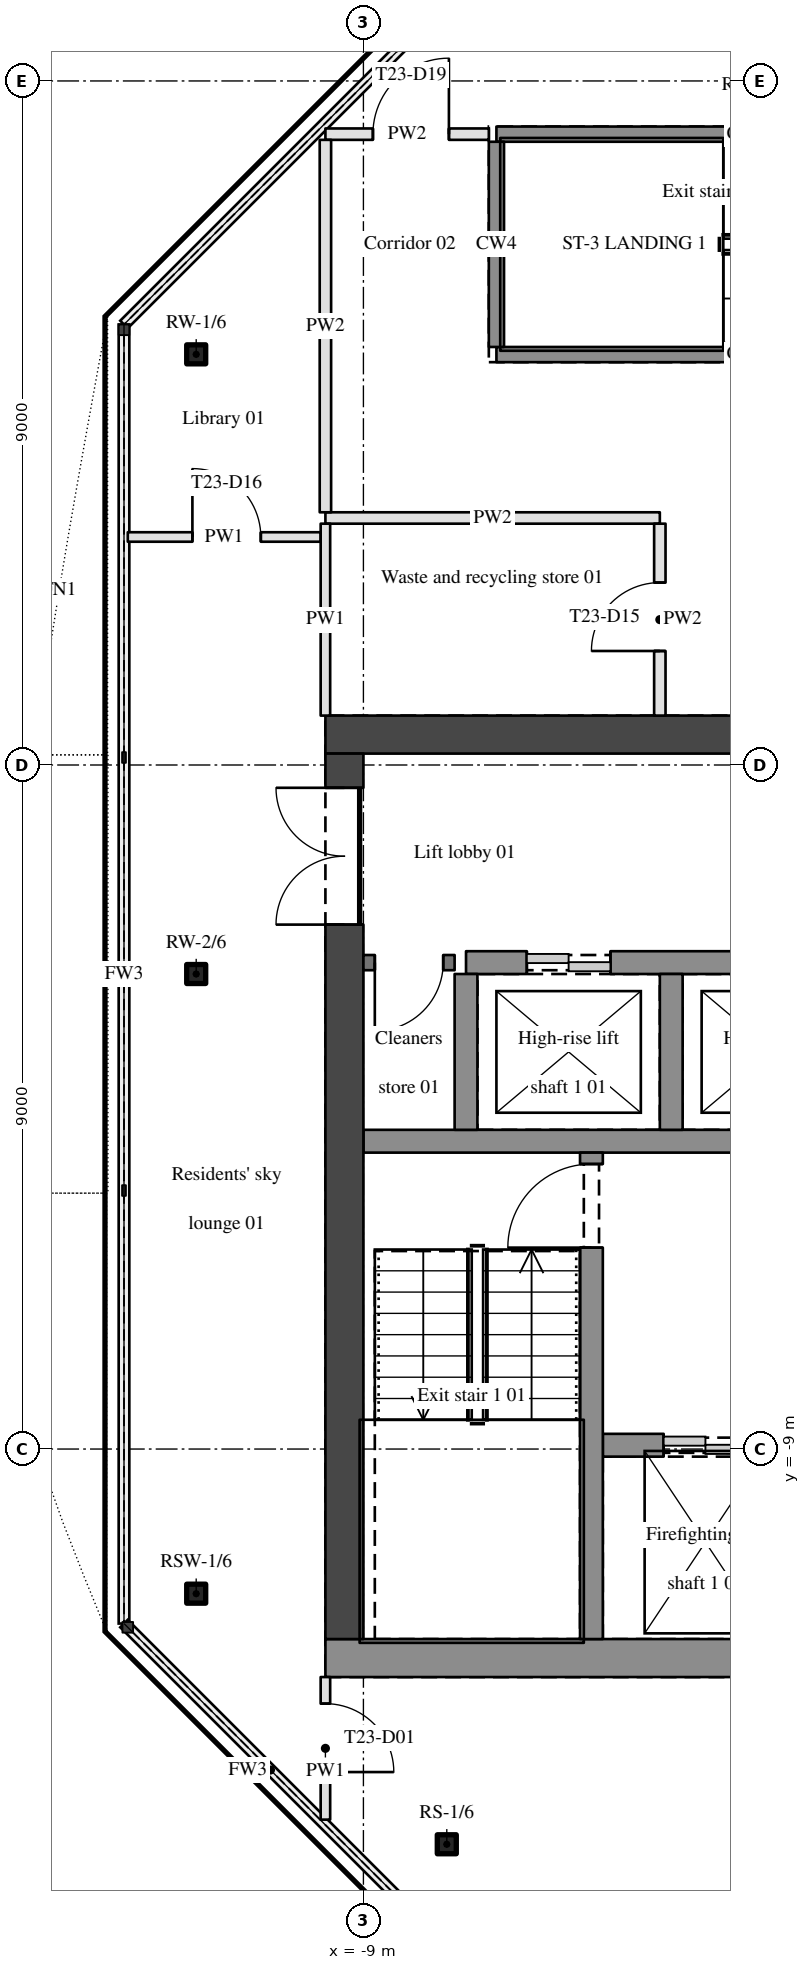
"""IFC4 building model, lengths in metres.
Left out: names, types, materials, properties, quantities, classifications, styles, units other than length and angle.
Written with IfcOpenShell. Run it as: python <this file> out.ifc"""

import sys

from ifc_helpers import new_model, si_unit, direction, frame, frame_2d, origin, origin_2d, place, context, subcontext, project, spatial, rectangle, hollow_rectangle, extrude, element, fill, save


model = new_model("IFC4")
c1 = context("Model", 3, precision=1e-05, world=origin(), true_north=direction((0.0, 1.0)))
c2 = subcontext(c1, "Body", "Model", "MODEL_VIEW")
j1 = project(units=[si_unit("LENGTHUNIT", "METRE"), si_unit("PLANEANGLEUNIT", "RADIAN")], contexts=[c1])
p1 = place(None, origin())
s1 = spatial("IfcSite", under=j1, at=p1, CompositionType="ELEMENT")
p2 = place(p1, origin())
s2 = spatial("IfcBuilding", under=s1, at=p2, CompositionType="ELEMENT")
p3 = place(p2, frame((0.0, 0.0, 294.15)))
s3 = spatial("IfcBuildingStorey", under=s2, at=p3, CompositionType="ELEMENT", Elevation=294.15)
for number, where, z_axis, x_axis in (
    (1, (-7.903, -14.2, 0.0), (0.0, 0.0, 1.0), (1.0, 0.0, 0.0)),
    (2, (-11.2, 5.403, 0.0), (0.0, 0.0, 1.0), (1.0, 0.0, 0.0)),
    (3, (-11.2, -2.75, 0.0), (0.0, 0.0, 1.0), (1.0, 0.0, 0.0)),
    (4, (-11.2, -10.903, 0.0), (0.0, 0.0, 1.0), (1.0, 0.0, 0.0)),
):
    element("IfcColumn", number, at=place(p3, frame(where, z_axis=z_axis, x_axis=x_axis)), inside=s3, PredefinedType="COLUMN", context=c2, shape_type="SweptSolid", body=[
        extrude(hollow_rectangle(XDim=0.25, YDim=0.25, WallThickness=0.02, InnerFilletRadius=0.03, OuterFilletRadius=0.05, at=origin_2d()), origin(), (0.0, 0.0, 1.0), 3.15),
    ])
p4 = place(p3, frame((-9.5, -11.75, 0.0), z_axis=(0.0, 0.0, 1.0), x_axis=(1.0, 0.0, 0.0)))
e5 = element("IfcWall", 5, at=p4, inside=s3, PredefinedType="SHEAR", context=c2, shape_type="SweptSolid", body=[
    extrude(rectangle(XDim=19.0, YDim=0.5, at=frame_2d((9.5, 0.0))), origin(), (0.0, 0.0, 1.0), 3.15),
])
p5 = place(p3, frame((-9.5, 0.4, 0.0), z_axis=(0.0, 0.0, 1.0), x_axis=(1.0, 0.0, 0.0)))
e6 = element("IfcWall", 6, at=p5, inside=s3, PredefinedType="SHEAR", context=c2, shape_type="SweptSolid", body=[
    extrude(rectangle(XDim=19.0, YDim=0.5, at=frame_2d((9.5, 0.0))), origin(), (0.0, 0.0, 1.0), 3.15),
])
p6 = place(p5, frame((8.6, 0.0, 0.0)))
e7 = element("IfcOpeningElement", 7, at=p6, cuts=e6, PredefinedType="OPENING", context=c2, shape_type="SweptSolid", body=[
    extrude(rectangle(XDim=1.8, YDim=2.1, at=frame_2d((0.9, 1.05))), frame((0.0, 0.26, 0.0), z_axis=(0.0, -1.0, 0.0), x_axis=(1.0, 0.0, 0.0)), (0.0, 0.0, 1.0), 0.52),
])
p7 = place(p5, frame((15.55, 0.0, 0.0)))
e8 = element("IfcOpeningElement", 8, at=p7, cuts=e6, PredefinedType="OPENING", context=c2, shape_type="SweptSolid", body=[
    extrude(rectangle(XDim=0.9, YDim=2.1, at=frame_2d((0.45, 1.05))), frame((0.0, 0.26, 0.0), z_axis=(0.0, -1.0, 0.0), x_axis=(1.0, 0.0, 0.0)), (0.0, 0.0, 1.0), 0.52),
])
p8 = place(p3, frame((-9.25, -11.5, 0.0), z_axis=(0.0, 0.0, 1.0), x_axis=(0.0, 1.0, 0.0)))
e9 = element("IfcWall", 9, at=p8, inside=s3, PredefinedType="SHEAR", context=c2, shape_type="SweptSolid", body=[
    extrude(rectangle(XDim=11.65, YDim=0.5, at=frame_2d((5.825, 0.0))), origin(), (0.0, 0.0, 1.0), 3.15),
])
p9 = place(p8, frame((9.4, 0.0, 0.0)))
e10 = element("IfcOpeningElement", 10, at=p9, cuts=e9, PredefinedType="OPENING", context=c2, shape_type="SweptSolid", body=[
    extrude(rectangle(XDim=1.8, YDim=2.1, at=frame_2d((0.9, 1.05))), frame((0.0, 0.26, 0.0), z_axis=(0.0, -1.0, 0.0), x_axis=(1.0, 0.0, 0.0)), (0.0, 0.0, 1.0), 0.52),
])
p10 = place(p3, frame((-5.85, -8.95, 0.0), z_axis=(0.0, 0.0, 1.0), x_axis=(1.0, 0.0, 0.0)))
e11 = element("IfcWall", 11, at=p10, inside=s3, PredefinedType="SHEAR", context=c2, shape_type="SweptSolid", body=[
    extrude(rectangle(XDim=11.7, YDim=0.3, at=frame_2d((5.85, 0.0))), origin(), (0.0, 0.0, 1.0), 3.15),
])
p11 = place(p10, frame((0.8, 0.0, 0.0)))
e12 = element("IfcOpeningElement", 12, at=p11, cuts=e11, PredefinedType="OPENING", context=c2, shape_type="SweptSolid", body=[
    extrude(rectangle(XDim=1.1, YDim=2.1, at=frame_2d((0.55, 1.05))), frame((0.0, 0.16, 0.0), z_axis=(0.0, -1.0, 0.0), x_axis=(1.0, 0.0, 0.0)), (0.0, 0.0, 1.0), 0.32),
])
p12 = place(p10, frame((3.8, 0.0, 0.0)))
e13 = element("IfcOpeningElement", 13, at=p12, cuts=e11, PredefinedType="OPENING", context=c2, shape_type="SweptSolid", body=[
    extrude(rectangle(XDim=1.1, YDim=2.1, at=frame_2d((0.55, 1.05))), frame((0.0, 0.16, 0.0), z_axis=(0.0, -1.0, 0.0), x_axis=(1.0, 0.0, 0.0)), (0.0, 0.0, 1.0), 0.32),
])
p13 = place(p10, frame((6.8, 0.0, 0.0)))
e14 = element("IfcOpeningElement", 14, at=p13, cuts=e11, PredefinedType="OPENING", context=c2, shape_type="SweptSolid", body=[
    extrude(rectangle(XDim=1.1, YDim=2.1, at=frame_2d((0.55, 1.05))), frame((0.0, 0.16, 0.0), z_axis=(0.0, -1.0, 0.0), x_axis=(1.0, 0.0, 0.0)), (0.0, 0.0, 1.0), 0.32),
])
p14 = place(p10, frame((9.8, 0.0, 0.0)))
e15 = element("IfcOpeningElement", 15, at=p14, cuts=e11, PredefinedType="OPENING", context=c2, shape_type="SweptSolid", body=[
    extrude(rectangle(XDim=1.1, YDim=2.1, at=frame_2d((0.55, 1.05))), frame((0.0, 0.16, 0.0), z_axis=(0.0, -1.0, 0.0), x_axis=(1.0, 0.0, 0.0)), (0.0, 0.0, 1.0), 0.32),
])
p15 = place(p3, frame((-9.0, -4.95, 0.0), z_axis=(0.0, 0.0, 1.0), x_axis=(1.0, 0.0, 0.0)))
e16 = element("IfcWall", 16, at=p15, inside=s3, PredefinedType="SHEAR", context=c2, shape_type="SweptSolid", body=[
    extrude(rectangle(XDim=6.75, YDim=0.3, at=frame_2d((3.375, 0.0))), origin(), (0.0, 0.0, 1.0), 3.15),
])
p16 = place(p3, frame((-7.8, -2.6, 0.0), z_axis=(0.0, 0.0, 1.0), x_axis=(-1.0, 0.0, 0.0)))
e17 = element("IfcWall", 17, at=p16, inside=s3, PredefinedType="SOLIDWALL", context=c2, shape_type="SweptSolid", body=[
    extrude(rectangle(XDim=1.2, YDim=0.2, at=frame_2d((0.6, 0.0))), origin(), (0.0, 0.0, 1.0), 2.85),
])
p17 = place(p16, frame((0.15, 0.0, 0.0)))
e18 = element("IfcOpeningElement", 18, at=p17, cuts=e17, PredefinedType="OPENING", context=c2, shape_type="SweptSolid", body=[
    extrude(rectangle(XDim=0.9, YDim=2.1, at=frame_2d((0.45, 1.05))), frame((0.0, 0.11, 0.0), z_axis=(0.0, -1.0, 0.0), x_axis=(1.0, 0.0, 0.0)), (0.0, 0.0, 1.0), 0.22),
])
p18 = place(p3, frame((-7.65, -2.6, 0.0), z_axis=(0.0, 0.0, 1.0), x_axis=(1.0, 0.0, 0.0)))
e19 = element("IfcWall", 19, at=p18, inside=s3, PredefinedType="SHEAR", context=c2, shape_type="SweptSolid", body=[
    extrude(rectangle(XDim=5.4, YDim=0.3, at=frame_2d((2.7, 0.0))), origin(), (0.0, 0.0, 1.0), 3.15),
])
p19 = place(p18, frame((0.8, 0.0, 0.0)))
e20 = element("IfcOpeningElement", 20, at=p19, cuts=e19, PredefinedType="OPENING", context=c2, shape_type="SweptSolid", body=[
    extrude(rectangle(XDim=1.1, YDim=2.1, at=frame_2d((0.55, 1.05))), frame((0.0, 0.16, 0.0), z_axis=(0.0, -1.0, 0.0), x_axis=(1.0, 0.0, 0.0)), (0.0, 0.0, 1.0), 0.32),
])
p20 = place(p18, frame((3.5, 0.0, 0.0)))
e21 = element("IfcOpeningElement", 21, at=p20, cuts=e19, PredefinedType="OPENING", context=c2, shape_type="SweptSolid", body=[
    extrude(rectangle(XDim=1.1, YDim=2.1, at=frame_2d((0.55, 1.05))), frame((0.0, 0.16, 0.0), z_axis=(0.0, -1.0, 0.0), x_axis=(1.0, 0.0, 0.0)), (0.0, 0.0, 1.0), 0.32),
])
p21 = place(p3, frame((-12.1, 3.0, 0.0), z_axis=(0.0, 0.0, 1.0), x_axis=(1.0, 0.0, 0.0)))
e22 = element("IfcWall", 22, at=p21, inside=s3, PredefinedType="PARTITIONING", context=c2, shape_type="SweptSolid", body=[
    extrude(rectangle(XDim=2.538, YDim=0.125, at=frame_2d((1.269, 0.0))), origin(), (0.0, 0.0, 1.0), 2.21),
])
p22 = place(p21, frame((0.85, 0.0, 0.0)))
e23 = element("IfcOpeningElement", 23, at=p22, cuts=e22, PredefinedType="OPENING", context=c2, shape_type="SweptSolid", body=[
    extrude(rectangle(XDim=0.9, YDim=2.1, at=frame_2d((0.45, 1.05))), frame((0.0, 0.073, 0.0), z_axis=(0.0, -1.0, 0.0), x_axis=(1.0, 0.0, 0.0)), (0.0, 0.0, 1.0), 0.145),
])
p23 = place(p3, frame((-9.5, 3.25, 0.0), z_axis=(0.0, 0.0, 1.0), x_axis=(1.0, 0.0, 0.0)))
e24 = element("IfcWall", 24, at=p23, inside=s3, PredefinedType="PARTITIONING", context=c2, shape_type="SweptSolid", body=[
    extrude(rectangle(XDim=4.4, YDim=0.15, at=frame_2d((2.2, 0.0))), origin(), (0.0, 0.0, 1.0), 2.21),
])
p24 = place(p3, frame((-7.25, 5.4, 0.0), z_axis=(0.0, 0.0, 1.0), x_axis=(1.0, 0.0, 0.0)))
e25 = element("IfcWall", 25, at=p24, inside=s3, PredefinedType="SHEAR", context=c2, shape_type="SweptSolid", body=[
    extrude(rectangle(XDim=6.6, YDim=0.2, at=frame_2d((3.3, 0.0))), origin(), (0.0, 0.0, 1.0), 3.15),
])
p25 = place(p24, frame((5.35, 0.0, 0.0)))
e26 = element("IfcOpeningElement", 26, at=p25, cuts=e25, PredefinedType="OPENING", context=c2, shape_type="SweptSolid", body=[
    extrude(rectangle(XDim=1.1, YDim=2.1, at=frame_2d((0.55, 1.05))), frame((0.0, 0.11, 0.0), z_axis=(0.0, -1.0, 0.0), x_axis=(1.0, 0.0, 0.0)), (0.0, 0.0, 1.0), 0.22),
])
p26 = place(p3, frame((-9.5, 8.3, 0.0), z_axis=(0.0, 0.0, 1.0), x_axis=(1.0, 0.0, 0.0)))
e27 = element("IfcWall", 27, at=p26, inside=s3, PredefinedType="PARTITIONING", context=c2, shape_type="SweptSolid", body=[
    extrude(rectangle(XDim=2.15, YDim=0.15, at=frame_2d((1.075, 0.0))), origin(), (0.0, 0.0, 1.0), 2.21),
])
p27 = place(p26, frame((0.625, 0.0, 0.0)))
e28 = element("IfcOpeningElement", 28, at=p27, cuts=e27, PredefinedType="OPENING", context=c2, shape_type="SweptSolid", body=[
    extrude(rectangle(XDim=1.0, YDim=2.1, at=frame_2d((0.5, 1.05))), frame((0.0, 0.085, 0.0), z_axis=(0.0, -1.0, 0.0), x_axis=(1.0, 0.0, 0.0)), (0.0, 0.0, 1.0), 0.17),
])
p28 = place(p3, frame((-7.25, 8.3, 0.0), z_axis=(0.0, 0.0, 1.0), x_axis=(1.0, 0.0, 0.0)))
e29 = element("IfcWall", 29, at=p28, inside=s3, PredefinedType="SHEAR", context=c2, shape_type="SweptSolid", body=[
    extrude(rectangle(XDim=6.6, YDim=0.2, at=frame_2d((3.3, 0.0))), origin(), (0.0, 0.0, 1.0), 3.15),
])
p29 = place(p3, frame((-9.5, -12.0, 0.0), z_axis=(0.0, 0.0, 1.0), x_axis=(0.0, -1.0, 0.0)))
e30 = element("IfcWall", 30, at=p29, inside=s3, PredefinedType="PARTITIONING", context=c2, shape_type="SweptSolid", body=[
    extrude(rectangle(XDim=1.876, YDim=0.125, at=frame_2d((0.938, 0.0))), origin(), (0.0, 0.0, 1.0), 2.21),
])
p30 = place(p29, frame((0.35, 0.0, 0.0)))
e31 = element("IfcOpeningElement", 31, at=p30, cuts=e30, PredefinedType="OPENING", context=c2, shape_type="SweptSolid", body=[
    extrude(rectangle(XDim=0.9, YDim=2.1, at=frame_2d((0.45, 1.05))), frame((0.0, 0.073, 0.0), z_axis=(0.0, -1.0, 0.0), x_axis=(1.0, 0.0, 0.0)), (0.0, 0.0, 1.0), 0.145),
])
p31 = place(p3, frame((-9.5, 0.65, 0.0), z_axis=(0.0, 0.0, 1.0), x_axis=(0.0, 1.0, 0.0)))
e32 = element("IfcWall", 32, at=p31, inside=s3, PredefinedType="PARTITIONING", context=c2, shape_type="SweptSolid", body=[
    extrude(rectangle(XDim=2.525, YDim=0.125, at=frame_2d((1.263, 0.0))), origin(), (0.0, 0.0, 1.0), 2.21),
])
p32 = place(p3, frame((-9.5, 3.325, 0.0), z_axis=(0.0, 0.0, 1.0), x_axis=(0.0, 1.0, 0.0)))
e33 = element("IfcWall", 33, at=p32, inside=s3, PredefinedType="PARTITIONING", context=c2, shape_type="SweptSolid", body=[
    extrude(rectangle(XDim=4.9, YDim=0.15, at=frame_2d((2.45, 0.0))), origin(), (0.0, 0.0, 1.0), 2.21),
])
p33 = place(p3, frame((-7.65, -4.8, 0.0), z_axis=(0.0, 0.0, 1.0), x_axis=(0.0, 1.0, 0.0)))
e34 = element("IfcWall", 34, at=p33, inside=s3, PredefinedType="SHEAR", context=c2, shape_type="SweptSolid", body=[
    extrude(rectangle(XDim=2.05, YDim=0.3, at=frame_2d((1.025, 0.0))), origin(), (0.0, 0.0, 1.0), 3.15),
])
p34 = place(p3, frame((-7.25, 5.5, 0.0), z_axis=(0.0, 0.0, 1.0), x_axis=(0.0, 1.0, 0.0)))
e35 = element("IfcWall", 35, at=p34, inside=s3, PredefinedType="SHEAR", context=c2, shape_type="SweptSolid", body=[
    extrude(rectangle(XDim=2.7, YDim=0.2, at=frame_2d((1.35, 0.0))), origin(), (0.0, 0.0, 1.0), 3.15),
])
p35 = place(p3, frame((-6.0, -11.5, 0.0), z_axis=(0.0, 0.0, 1.0), x_axis=(0.0, 1.0, 0.0)))
e36 = element("IfcWall", 36, at=p35, inside=s3, PredefinedType="SHEAR", context=c2, shape_type="SweptSolid", body=[
    extrude(rectangle(XDim=6.4, YDim=0.3, at=frame_2d((3.2, 0.0))), origin(), (0.0, 0.0, 1.0), 3.15),
])
p36 = place(p35, frame((5.15, 0.0, 0.0)))
e37 = element("IfcOpeningElement", 37, at=p36, cuts=e36, PredefinedType="OPENING", context=c2, shape_type="SweptSolid", body=[
    extrude(rectangle(XDim=1.1, YDim=2.1, at=frame_2d((0.55, 1.05))), frame((0.0, 0.16, 0.0), z_axis=(0.0, -1.0, 0.0), x_axis=(1.0, 0.0, 0.0)), (0.0, 0.0, 1.0), 0.32),
])
p37 = place(p3, frame((-5.1, 0.65, 0.0), z_axis=(0.0, 0.0, 1.0), x_axis=(0.0, 1.0, 0.0)))
e38 = element("IfcWall", 38, at=p37, inside=s3, PredefinedType="PARTITIONING", context=c2, shape_type="SweptSolid", body=[
    extrude(rectangle(XDim=2.525, YDim=0.15, at=frame_2d((1.263, 0.0))), origin(), (0.0, 0.0, 1.0), 2.21),
])
p38 = place(p37, frame((0.85, 0.0, 0.0)))
e39 = element("IfcOpeningElement", 39, at=p38, cuts=e38, PredefinedType="OPENING", context=c2, shape_type="SweptSolid", body=[
    extrude(rectangle(XDim=0.9, YDim=2.1, at=frame_2d((0.45, 1.05))), frame((0.0, 0.085, 0.0), z_axis=(0.0, -1.0, 0.0), x_axis=(1.0, 0.0, 0.0)), (0.0, 0.0, 1.0), 0.17),
])
p39 = place(p3, frame((-4.95, -4.8, 0.0), z_axis=(0.0, 0.0, 1.0), x_axis=(0.0, 1.0, 0.0)))
e40 = element("IfcWall", 40, at=p39, inside=s3, PredefinedType="SHEAR", context=c2, shape_type="SweptSolid", body=[
    extrude(rectangle(XDim=2.05, YDim=0.3, at=frame_2d((1.025, 0.0))), origin(), (0.0, 0.0, 1.0), 3.15),
])
p40 = place(p27, origin())
e41 = element("IfcDoor", 41, at=p40, inside=s3, OperationType="SINGLE_SWING_RIGHT", PredefinedType="DOOR", context=c2, shape_type="SweptSolid", body=[
    extrude(rectangle(XDim=1.0, YDim=2.1, at=frame_2d((0.5, 1.05))), frame((0.0, 0.025, 0.0), z_axis=(0.0, -1.0, 0.0), x_axis=(1.0, 0.0, 0.0)), (0.0, 0.0, 1.0), 0.05),
])
fill(e28, e41)
p41 = place(p9, origin())
e42 = element("IfcDoor", 42, at=p41, inside=s3, OperationType="DOUBLE_DOOR_SINGLE_SWING", PredefinedType="DOOR", context=c2, shape_type="SweptSolid", body=[
    extrude(rectangle(XDim=1.8, YDim=2.1, at=frame_2d((0.9, 1.05))), frame((0.0, 0.025, 0.0), z_axis=(0.0, -1.0, 0.0), x_axis=(1.0, 0.0, 0.0)), (0.0, 0.0, 1.0), 0.05),
])
fill(e10, e42)
p42 = place(p36, origin())
e43 = element("IfcDoor", 43, at=p42, inside=s3, OperationType="SINGLE_SWING_LEFT", PredefinedType="DOOR", context=c2, shape_type="SweptSolid", body=[
    extrude(rectangle(XDim=1.1, YDim=2.1, at=frame_2d((0.55, 1.05))), frame((0.0, 0.025, 0.0), z_axis=(0.0, -1.0, 0.0), x_axis=(1.0, 0.0, 0.0)), (0.0, 0.0, 1.0), 0.05),
])
fill(e37, e43)
p43 = place(p17, origin())
e44 = element("IfcDoor", 44, at=p43, inside=s3, OperationType="SINGLE_SWING_RIGHT", PredefinedType="DOOR", context=c2, shape_type="SweptSolid", body=[
    extrude(rectangle(XDim=0.9, YDim=2.1, at=frame_2d((0.45, 1.05))), frame((0.0, 0.025, 0.0), z_axis=(0.0, -1.0, 0.0), x_axis=(1.0, 0.0, 0.0)), (0.0, 0.0, 1.0), 0.05),
])
fill(e18, e44)
p44 = place(p38, origin())
e45 = element("IfcDoor", 45, at=p44, inside=s3, OperationType="SINGLE_SWING_LEFT", PredefinedType="DOOR", context=c2, shape_type="SweptSolid", body=[
    extrude(rectangle(XDim=0.9, YDim=2.1, at=frame_2d((0.45, 1.05))), frame((0.0, 0.025, 0.0), z_axis=(0.0, -1.0, 0.0), x_axis=(1.0, 0.0, 0.0)), (0.0, 0.0, 1.0), 0.05),
])
fill(e39, e45)
p45 = place(p22, origin())
e46 = element("IfcDoor", 46, at=p45, inside=s3, OperationType="SINGLE_SWING_LEFT", PredefinedType="DOOR", context=c2, shape_type="SweptSolid", body=[
    extrude(rectangle(XDim=0.9, YDim=2.1, at=frame_2d((0.45, 1.05))), frame((0.0, 0.025, 0.0), z_axis=(0.0, -1.0, 0.0), x_axis=(1.0, 0.0, 0.0)), (0.0, 0.0, 1.0), 0.05),
])
fill(e23, e46)
p46 = place(p30, origin())
e47 = element("IfcDoor", 47, at=p46, inside=s3, OperationType="SINGLE_SWING_RIGHT", PredefinedType="DOOR", context=c2, shape_type="SweptSolid", body=[
    extrude(rectangle(XDim=0.9, YDim=2.1, at=frame_2d((0.45, 1.05))), frame((0.0, 0.025, 0.0), z_axis=(0.0, -1.0, 0.0), x_axis=(1.0, 0.0, 0.0)), (0.0, 0.0, 1.0), 0.05),
])
fill(e31, e47)
p47 = place(p11, origin())
e48 = element("IfcDoor", 48, at=p47, inside=s3, OperationType="DOUBLE_DOOR_SLIDING", PredefinedType="DOOR", context=c2, shape_type="SweptSolid", body=[
    extrude(rectangle(XDim=1.1, YDim=2.1, at=frame_2d((0.55, 1.05))), frame((0.0, 0.025, 0.0), z_axis=(0.0, -1.0, 0.0), x_axis=(1.0, 0.0, 0.0)), (0.0, 0.0, 1.0), 0.05),
])
fill(e12, e48)
p48 = place(p19, origin())
e49 = element("IfcDoor", 49, at=p48, inside=s3, OperationType="DOUBLE_DOOR_SLIDING", PredefinedType="DOOR", context=c2, shape_type="SweptSolid", body=[
    extrude(rectangle(XDim=1.1, YDim=2.1, at=frame_2d((0.55, 1.05))), frame((0.0, 0.025, 0.0), z_axis=(0.0, -1.0, 0.0), x_axis=(1.0, 0.0, 0.0)), (0.0, 0.0, 1.0), 0.05),
])
fill(e20, e49)
save(model, sys.argv[1])
